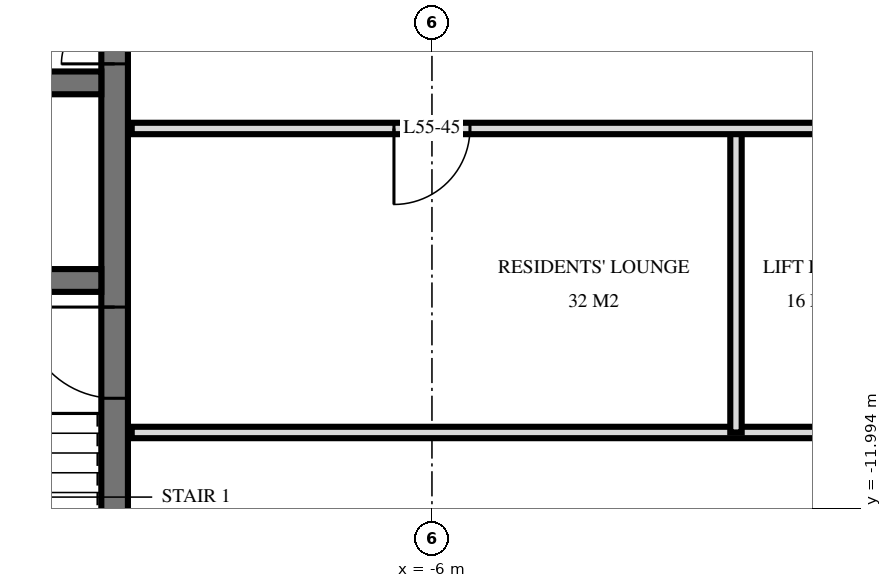
"""IFC4 building model, lengths in metres.
Left out: names, types, materials, properties, quantities, classifications, styles, units other than length and angle.
Written with IfcOpenShell. Run it as: python <this file> out.ifc"""

import sys

from ifc_helpers import new_model, si_unit, direction, frame, frame_2d, origin, place, context, subcontext, project, spatial, rectangle, extrude, element, fill, save


model = new_model("IFC4")
c1 = context("Model", 3, precision=1e-05, world=origin(), true_north=direction((0.0, 1.0)))
c2 = subcontext(c1, "Body", "Model", "MODEL_VIEW")
j1 = project(units=[si_unit("LENGTHUNIT", "METRE"), si_unit("PLANEANGLEUNIT", "RADIAN")], contexts=[c1])
p1 = place(None, origin())
s1 = spatial("IfcSite", under=j1, at=p1, CompositionType="ELEMENT")
p2 = place(p1, origin())
s2 = spatial("IfcBuilding", under=s1, at=p2, CompositionType="ELEMENT")
p3 = place(p2, frame((0.0, 0.0, 211.6)))
s3 = spatial("IfcBuildingStorey", under=s2, at=p3, CompositionType="ELEMENT", Elevation=211.6)
p4 = place(p3, frame((-10.175, -14.55, 0.0), z_axis=(0.0, 0.0, 1.0), x_axis=(0.0, 1.0, 0.0)))
e1 = element("IfcWall", 1, at=p4, inside=s3, PredefinedType="SHEAR", context=c2, shape_type="SweptSolid", body=[
    extrude(rectangle(XDim=14.1, YDim=0.35, at=frame_2d((7.05, 0.0))), origin(), (0.0, 0.0, 1.0), 3.5),
])
p5 = place(p4, frame((8.4, 0.0, 0.0)))
e2 = element("IfcOpeningElement", 2, at=p5, cuts=e1, PredefinedType="OPENING", context=c2, shape_type="SweptSolid", body=[
    extrude(rectangle(XDim=1.4, YDim=2.4, at=frame_2d((0.7, 1.2))), frame((0.0, 0.185, 0.0), z_axis=(0.0, -1.0, 0.0), x_axis=(1.0, 0.0, 0.0)), (0.0, 0.0, 1.0), 0.37),
])
p6 = place(p4, frame((10.0, 0.0, 0.0)))
e3 = element("IfcOpeningElement", 3, at=p6, cuts=e1, PredefinedType="OPENING", context=c2, shape_type="SweptSolid", body=[
    extrude(rectangle(XDim=1.4, YDim=2.4, at=frame_2d((0.7, 1.2))), frame((0.0, 0.185, 0.0), z_axis=(0.0, -1.0, 0.0), x_axis=(1.0, 0.0, 0.0)), (0.0, 0.0, 1.0), 0.37),
])
p7 = place(p4, frame((4.0, 0.0, 0.0)))
e4 = element("IfcOpeningElement", 4, at=p7, cuts=e1, PredefinedType="OPENING", context=c2, shape_type="SweptSolid", body=[
    extrude(rectangle(XDim=1.2, YDim=2.1, at=frame_2d((0.6, 1.05))), frame((0.0, 0.185, 0.0), z_axis=(0.0, -1.0, 0.0), x_axis=(1.0, 0.0, 0.0)), (0.0, 0.0, 1.0), 0.37),
])
p8 = place(p3, frame((-24.05, -6.4, 0.0), z_axis=(0.0, 0.0, 1.0), x_axis=(1.0, 0.0, 0.0)))
e5 = element("IfcWall", 5, at=p8, inside=s3, PredefinedType="SHEAR", context=c2, shape_type="SweptSolid", body=[
    extrude(rectangle(XDim=13.7, YDim=0.3, at=frame_2d((6.85, 0.0))), origin(), (0.0, 0.0, 1.0), 3.5),
])
p9 = place(p8, frame((0.55, 0.0, 0.0)))
e6 = element("IfcOpeningElement", 6, at=p9, cuts=e5, PredefinedType="OPENING", context=c2, shape_type="SweptSolid", body=[
    extrude(rectangle(XDim=1.1, YDim=2.1, at=frame_2d((0.55, 1.05))), frame((0.0, 0.16, 0.0), z_axis=(0.0, -1.0, 0.0), x_axis=(1.0, 0.0, 0.0)), (0.0, 0.0, 1.0), 0.32),
])
p10 = place(p8, frame((5.8, 0.0, 0.0)))
e7 = element("IfcOpeningElement", 7, at=p10, cuts=e5, PredefinedType="OPENING", context=c2, shape_type="SweptSolid", body=[
    extrude(rectangle(XDim=1.1, YDim=2.1, at=frame_2d((0.55, 1.05))), frame((0.0, 0.16, 0.0), z_axis=(0.0, -1.0, 0.0), x_axis=(1.0, 0.0, 0.0)), (0.0, 0.0, 1.0), 0.32),
])
p11 = place(p3, frame((-24.05, -9.0, 0.0), z_axis=(0.0, 0.0, 1.0), x_axis=(1.0, 0.0, 0.0)))
e8 = element("IfcWall", 8, at=p11, inside=s3, PredefinedType="SHEAR", context=c2, shape_type="SweptSolid", body=[
    extrude(rectangle(XDim=13.7, YDim=0.3, at=frame_2d((6.85, 0.0))), origin(), (0.0, 0.0, 1.0), 3.5),
])
p12 = place(p11, frame((8.8, 0.0, 0.0)))
e9 = element("IfcOpeningElement", 9, at=p12, cuts=e8, PredefinedType="OPENING", context=c2, shape_type="SweptSolid", body=[
    extrude(rectangle(XDim=1.1, YDim=2.1, at=frame_2d((0.55, 1.05))), frame((0.0, 0.16, 0.0), z_axis=(0.0, -1.0, 0.0), x_axis=(1.0, 0.0, 0.0)), (0.0, 0.0, 1.0), 0.32),
])
p13 = place(p3, frame((-2.0, -11.0, 0.0), z_axis=(0.0, 0.0, 1.0), x_axis=(0.0, 1.0, 0.0)))
e10 = element("IfcWall", 10, at=p13, inside=s3, PredefinedType="PARTITIONING", context=c2, shape_type="SweptSolid", body=[
    extrude(rectangle(XDim=4.0, YDim=0.15, at=frame_2d((2.0, 0.0))), origin(), (0.0, 0.0, 1.0), 3.22),
])
p14 = place(p3, frame((-9.95, -11.0, 0.0), z_axis=(0.0, 0.0, 1.0), x_axis=(1.0, 0.0, 0.0)))
e11 = element("IfcWall", 11, at=p14, inside=s3, PredefinedType="PARTITIONING", context=c2, shape_type="SweptSolid", body=[
    extrude(rectangle(XDim=19.9, YDim=0.15, at=frame_2d((9.95, 0.0))), origin(), (0.0, 0.0, 1.0), 3.22),
])
p15 = place(p14, frame((9.45, 0.0, 0.0)))
e12 = element("IfcOpeningElement", 12, at=p15, cuts=e11, PredefinedType="OPENING", context=c2, shape_type="SweptSolid", body=[
    extrude(rectangle(XDim=1.0, YDim=2.1, at=frame_2d((0.5, 1.05))), frame((0.0, 0.085, 0.0), z_axis=(0.0, -1.0, 0.0), x_axis=(1.0, 0.0, 0.0)), (0.0, 0.0, 1.0), 0.17),
])
p16 = place(p14, frame((15.45, 0.0, 0.0)))
e13 = element("IfcOpeningElement", 13, at=p16, cuts=e11, PredefinedType="OPENING", context=c2, shape_type="SweptSolid", body=[
    extrude(rectangle(XDim=1.0, YDim=2.1, at=frame_2d((0.5, 1.05))), frame((0.0, 0.085, 0.0), z_axis=(0.0, -1.0, 0.0), x_axis=(1.0, 0.0, 0.0)), (0.0, 0.0, 1.0), 0.17),
])
p17 = place(p3, frame((-9.95, -7.0, 0.0), z_axis=(0.0, 0.0, 1.0), x_axis=(1.0, 0.0, 0.0)))
e14 = element("IfcWall", 14, at=p17, inside=s3, PredefinedType="PARTITIONING", context=c2, shape_type="SweptSolid", body=[
    extrude(rectangle(XDim=19.9, YDim=0.15, at=frame_2d((9.95, 0.0))), origin(), (0.0, 0.0, 1.0), 3.22),
])
p18 = place(p17, frame((9.45, 0.0, 0.0)))
e15 = element("IfcOpeningElement", 15, at=p18, cuts=e14, PredefinedType="OPENING", context=c2, shape_type="SweptSolid", body=[
    extrude(rectangle(XDim=1.0, YDim=2.1, at=frame_2d((0.5, 1.05))), frame((0.0, 0.085, 0.0), z_axis=(0.0, -1.0, 0.0), x_axis=(1.0, 0.0, 0.0)), (0.0, 0.0, 1.0), 0.17),
])
p19 = place(p17, frame((3.45, 0.0, 0.0)))
e16 = element("IfcOpeningElement", 16, at=p19, cuts=e14, PredefinedType="OPENING", context=c2, shape_type="SweptSolid", body=[
    extrude(rectangle(XDim=1.0, YDim=2.1, at=frame_2d((0.5, 1.05))), frame((0.0, 0.085, 0.0), z_axis=(0.0, -1.0, 0.0), x_axis=(1.0, 0.0, 0.0)), (0.0, 0.0, 1.0), 0.17),
])
p20 = place(p5, origin())
e17 = element("IfcDoor", 17, at=p20, inside=s3, OperationType="DOUBLE_DOOR_SINGLE_SWING", PredefinedType="DOOR", context=c2, shape_type="SweptSolid", body=[
    extrude(rectangle(XDim=1.4, YDim=2.4, at=frame_2d((0.7, 1.2))), frame((0.0, 0.025, 0.0), z_axis=(0.0, -1.0, 0.0), x_axis=(1.0, 0.0, 0.0)), (0.0, 0.0, 1.0), 0.05),
])
fill(e2, e17)
p21 = place(p7, origin())
e18 = element("IfcDoor", 18, at=p21, inside=s3, OperationType="SINGLE_SWING_LEFT", PredefinedType="DOOR", context=c2, shape_type="SweptSolid", body=[
    extrude(rectangle(XDim=1.2, YDim=2.1, at=frame_2d((0.6, 1.05))), frame((0.0, 0.025, 0.0), z_axis=(0.0, -1.0, 0.0), x_axis=(1.0, 0.0, 0.0)), (0.0, 0.0, 1.0), 0.05),
])
fill(e4, e18)
p22 = place(p19, frame((0.5, 0.0, 0.0), z_axis=(0.0, 0.0, 1.0), x_axis=(-1.0, 0.0, 0.0)))
e19 = element("IfcDoor", 19, at=p22, inside=s3, OperationType="SINGLE_SWING_LEFT", PredefinedType="DOOR", context=c2, shape_type="SweptSolid", body=[
    extrude(rectangle(XDim=1.0, YDim=2.1, at=frame_2d((0.0, 1.05))), frame((0.0, -0.025, 0.0), z_axis=(0.0, 1.0, 0.0), x_axis=(-1.0, 0.0, 0.0)), (0.0, 0.0, 1.0), 0.05),
])
fill(e16, e19)
save(model, sys.argv[1])
